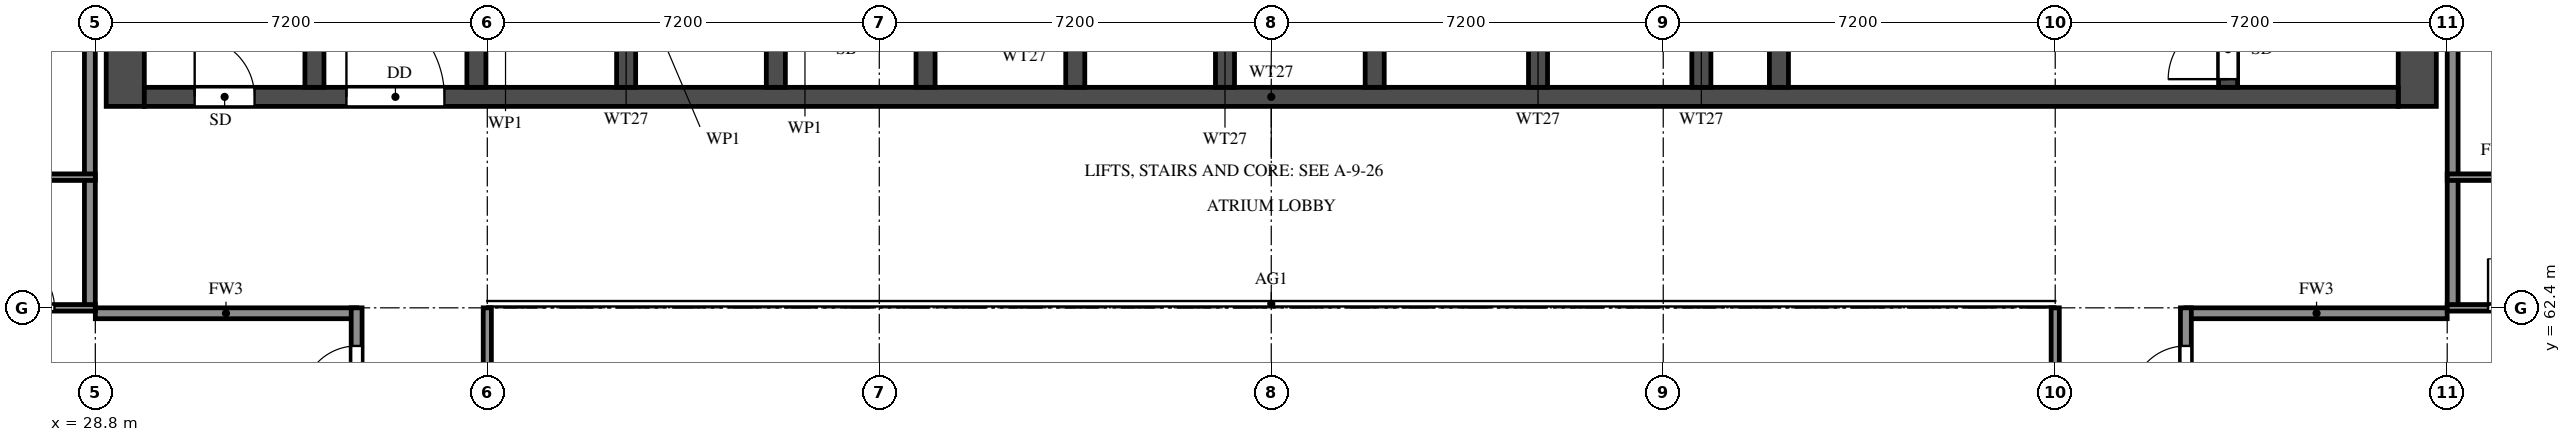
"""IFC4 building model, lengths in metres.
Left out: names, types, materials, properties, quantities, classifications, styles, units other than length and angle.
Written with IfcOpenShell. Run it as: python <this file> out.ifc"""

import sys

from ifc_helpers import new_model, si_unit, direction, frame, frame_2d, origin, place, context, subcontext, project, spatial, rectangle, extrude, element, fill, save


model = new_model("IFC4")
c1 = context("Model", 3, precision=1e-05, world=origin(), true_north=direction((0.0, 1.0)))
c2 = subcontext(c1, "Body", "Model", "MODEL_VIEW")
j1 = project(units=[si_unit("LENGTHUNIT", "METRE"), si_unit("PLANEANGLEUNIT", "RADIAN")], contexts=[c1])
p1 = place(None, origin())
s1 = spatial("IfcSite", under=j1, at=p1, CompositionType="ELEMENT")
p2 = place(p1, origin())
s2 = spatial("IfcBuilding", under=s1, at=p2, CompositionType="ELEMENT")
p3 = place(p2, frame((0.0, 0.0, 195.5)))
s3 = spatial("IfcBuildingStorey", under=s2, at=p3, CompositionType="ELEMENT", Elevation=195.5)
for number, where, z_axis, x_axis in (
    (1, (29.35, 66.1, 0.0), (0.0, 0.0, 1.0), (0.0, 1.0, 0.0)),
    (2, (71.45, 66.1, 0.0), (0.0, 0.0, 1.0), (0.0, 1.0, 0.0)),
):
    element("IfcWall", number, at=place(p3, frame(where, z_axis=z_axis, x_axis=x_axis)), inside=s3, PredefinedType="SHEAR", context=c2, shape_type="SweptSolid", body=[
        extrude(rectangle(XDim=11.9, YDim=0.7, at=frame_2d((5.95, 0.0))), origin(), (0.0, 0.0, 1.0), 3.2),
    ])
p4 = place(p3, frame((29.7, 66.275, 0.0), z_axis=(0.0, 0.0, 1.0), x_axis=(1.0, 0.0, 0.0)))
e3 = element("IfcWall", 3, at=p4, inside=s3, PredefinedType="SHEAR", context=c2, shape_type="SweptSolid", body=[
    extrude(rectangle(XDim=41.4, YDim=0.35, at=frame_2d((20.7, 0.0))), origin(), (0.0, 0.0, 1.0), 3.2),
])
p5 = place(p4, frame((0.925, 0.0, 0.0)))
e4 = element("IfcOpeningElement", 4, at=p5, cuts=e3, PredefinedType="OPENING", context=c2, shape_type="SweptSolid", body=[
    extrude(rectangle(XDim=1.1, YDim=2.1, at=frame_2d((0.55, 1.05))), frame((0.0, 0.185, 0.0), z_axis=(0.0, -1.0, 0.0), x_axis=(1.0, 0.0, 0.0)), (0.0, 0.0, 1.0), 0.37),
])
p6 = place(p4, frame((3.712, 0.0, 0.0)))
e5 = element("IfcOpeningElement", 5, at=p6, cuts=e3, PredefinedType="OPENING", context=c2, shape_type="SweptSolid", body=[
    extrude(rectangle(XDim=1.8, YDim=2.1, at=frame_2d((0.9, 1.05))), frame((0.0, 0.185, 0.0), z_axis=(0.0, -1.0, 0.0), x_axis=(1.0, 0.0, 0.0)), (0.0, 0.0, 1.0), 0.37),
])
p7 = place(p3, frame((32.825, 66.45, 0.0), z_axis=(0.0, 0.0, 1.0), x_axis=(0.0, 1.0, 0.0)))
e6 = element("IfcWall", 6, at=p7, inside=s3, PredefinedType="SHEAR", context=c2, shape_type="SweptSolid", body=[
    extrude(rectangle(XDim=10.85, YDim=0.35, at=frame_2d((5.425, 0.0))), origin(), (0.0, 0.0, 1.0), 3.2),
])
p8 = place(p3, frame((67.975, 66.45, 0.0), z_axis=(0.0, 0.0, 1.0), x_axis=(0.0, 1.0, 0.0)))
e7 = element("IfcWall", 7, at=p8, inside=s3, PredefinedType="SHEAR", context=c2, shape_type="SweptSolid", body=[
    extrude(rectangle(XDim=10.85, YDim=0.35, at=frame_2d((5.425, 0.0))), origin(), (0.0, 0.0, 1.0), 3.2),
])
p9 = place(p8, frame((0.15, 0.0, 0.0)))
e8 = element("IfcOpeningElement", 8, at=p9, cuts=e7, PredefinedType="OPENING", context=c2, shape_type="SweptSolid", body=[
    extrude(rectangle(XDim=1.1, YDim=2.1, at=frame_2d((0.55, 1.05))), frame((0.0, 0.185, 0.0), z_axis=(0.0, -1.0, 0.0), x_axis=(1.0, 0.0, 0.0)), (0.0, 0.0, 1.0), 0.37),
])
p10 = place(p3, frame((59.725, 66.45, 0.0), z_axis=(0.0, 0.0, 1.0), x_axis=(0.0, 1.0, 0.0)))
e9 = element("IfcWall", 9, at=p10, inside=s3, PredefinedType="SHEAR", context=c2, shape_type="SweptSolid", body=[
    extrude(rectangle(XDim=6.125, YDim=0.35, at=frame_2d((3.062, 0.0))), origin(), (0.0, 0.0, 1.0), 3.2),
])
p11 = place(p10, frame((3.85, 0.0, 0.0)))
e10 = element("IfcOpeningElement", 10, at=p11, cuts=e9, PredefinedType="OPENING", context=c2, shape_type="SweptSolid", body=[
    extrude(rectangle(XDim=1.2, YDim=2.1, at=frame_2d((0.6, 1.05))), frame((0.0, 0.185, 0.0), z_axis=(0.0, -1.0, 0.0), x_axis=(1.0, 0.0, 0.0)), (0.0, 0.0, 1.0), 0.37),
])
for number, where, z_axis, x_axis in (
    (11, (35.8, 66.45, 0.0), (0.0, 0.0, 1.0), (0.0, 1.0, 0.0)),
    (12, (38.55, 66.45, 0.0), (0.0, 0.0, 1.0), (0.0, 1.0, 0.0)),
    (13, (41.3, 66.45, 0.0), (0.0, 0.0, 1.0), (0.0, 1.0, 0.0)),
    (14, (44.05, 66.45, 0.0), (0.0, 0.0, 1.0), (0.0, 1.0, 0.0)),
    (15, (46.8, 66.45, 0.0), (0.0, 0.0, 1.0), (0.0, 1.0, 0.0)),
    (16, (49.55, 66.45, 0.0), (0.0, 0.0, 1.0), (0.0, 1.0, 0.0)),
    (17, (52.3, 66.45, 0.0), (0.0, 0.0, 1.0), (0.0, 1.0, 0.0)),
    (18, (55.3, 66.45, 0.0), (0.0, 0.0, 1.0), (0.0, 1.0, 0.0)),
    (19, (58.3, 66.45, 0.0), (0.0, 0.0, 1.0), (0.0, 1.0, 0.0)),
):
    element("IfcWall", number, at=place(p3, frame(where, z_axis=z_axis, x_axis=x_axis)), inside=s3, PredefinedType="SHEAR", context=c2, shape_type="SweptSolid", body=[
        extrude(rectangle(XDim=2.425, YDim=0.35, at=frame_2d((1.212, 0.0))), origin(), (0.0, 0.0, 1.0), 3.2),
    ])
for number, where, z_axis, x_axis in (
    (20, (28.8, 62.3, 0.0), (0.0, 0.0, 1.0), (1.0, 0.0, 0.0)),
    (21, (67.2, 62.3, 0.0), (0.0, 0.0, 1.0), (1.0, 0.0, 0.0)),
):
    element("IfcWall", number, at=place(p3, frame(where, z_axis=z_axis, x_axis=x_axis)), inside=s3, PredefinedType="SOLIDWALL", context=c2, shape_type="SweptSolid", body=[
        extrude(rectangle(XDim=4.8, YDim=0.2, at=frame_2d((2.4, 0.0))), origin(), (0.0, 0.0, 1.0), 3.2),
    ])
p12 = place(p3, frame((28.7, 62.4, 0.0), z_axis=(0.0, 0.0, 1.0), x_axis=(0.0, 1.0, 0.0)))
e22 = element("IfcWall", 22, at=p12, inside=s3, PredefinedType="SOLIDWALL", context=c2, shape_type="SweptSolid", body=[
    extrude(rectangle(XDim=15.6, YDim=0.2, at=frame_2d((7.8, 0.0))), origin(), (0.0, 0.0, 1.0), 3.2),
])
p13 = place(p3, frame((33.6, 45.6, 0.0), z_axis=(0.0, 0.0, 1.0), x_axis=(0.0, 1.0, 0.0)))
e23 = element("IfcWall", 23, at=p13, inside=s3, PredefinedType="SOLIDWALL", context=c2, shape_type="SweptSolid", body=[
    extrude(rectangle(XDim=16.8, YDim=0.2, at=frame_2d((8.4, 0.0))), origin(), (0.0, 0.0, 1.0), 3.2),
])
p14 = place(p13, frame((0.7, 0.0, 0.0)))
e24 = element("IfcOpeningElement", 24, at=p14, cuts=e23, PredefinedType="OPENING", context=c2, shape_type="SweptSolid", body=[
    extrude(rectangle(XDim=1.0, YDim=2.1, at=frame_2d((0.5, 1.05))), frame((0.0, 0.11, 0.0), z_axis=(0.0, -1.0, 0.0), x_axis=(1.0, 0.0, 0.0)), (0.0, 0.0, 1.0), 0.22),
])
p15 = place(p13, frame((8.3, 0.0, 0.0)))
e25 = element("IfcOpeningElement", 25, at=p15, cuts=e23, PredefinedType="OPENING", context=c2, shape_type="SweptSolid", body=[
    extrude(rectangle(XDim=1.0, YDim=2.1, at=frame_2d((0.5, 1.05))), frame((0.0, 0.11, 0.0), z_axis=(0.0, -1.0, 0.0), x_axis=(1.0, 0.0, 0.0)), (0.0, 0.0, 1.0), 0.22),
])
p16 = place(p13, frame((15.1, 0.0, 0.0)))
e26 = element("IfcOpeningElement", 26, at=p16, cuts=e23, PredefinedType="OPENING", context=c2, shape_type="SweptSolid", body=[
    extrude(rectangle(XDim=1.0, YDim=2.1, at=frame_2d((0.5, 1.05))), frame((0.0, 0.11, 0.0), z_axis=(0.0, -1.0, 0.0), x_axis=(1.0, 0.0, 0.0)), (0.0, 0.0, 1.0), 0.22),
])
p17 = place(p3, frame((67.2, 60.0, 0.0), z_axis=(0.0, 0.0, 1.0), x_axis=(0.0, 1.0, 0.0)))
e27 = element("IfcWall", 27, at=p17, inside=s3, PredefinedType="SOLIDWALL", context=c2, shape_type="SweptSolid", body=[
    extrude(rectangle(XDim=2.4, YDim=0.2, at=frame_2d((1.2, 0.0))), origin(), (0.0, 0.0, 1.0), 3.2),
])
p18 = place(p17, frame((0.7, 0.0, 0.0)))
e28 = element("IfcOpeningElement", 28, at=p18, cuts=e27, PredefinedType="OPENING", context=c2, shape_type="SweptSolid", body=[
    extrude(rectangle(XDim=1.0, YDim=2.1, at=frame_2d((0.5, 1.05))), frame((0.0, 0.11, 0.0), z_axis=(0.0, -1.0, 0.0), x_axis=(1.0, 0.0, 0.0)), (0.0, 0.0, 1.0), 0.22),
])
p19 = place(p3, frame((72.1, 62.4, 0.0), z_axis=(0.0, 0.0, 1.0), x_axis=(0.0, 1.0, 0.0)))
e29 = element("IfcWall", 29, at=p19, inside=s3, PredefinedType="SOLIDWALL", context=c2, shape_type="SweptSolid", body=[
    extrude(rectangle(XDim=15.6, YDim=0.2, at=frame_2d((7.8, 0.0))), origin(), (0.0, 0.0, 1.0), 3.2),
])
p20 = place(p3, frame((26.4, 62.4, 0.0), z_axis=(0.0, 0.0, 1.0), x_axis=(1.0, 0.0, 0.0)))
e30 = element("IfcWall", 30, at=p20, inside=s3, PredefinedType="PARTITIONING", context=c2, shape_type="SweptSolid", body=[
    extrude(rectangle(XDim=2.4, YDim=0.12, at=frame_2d((1.2, 0.0))), origin(), (0.0, 0.0, 1.0), 3.2),
])
p21 = place(p20, frame((0.75, 0.0, 0.0)))
e31 = element("IfcOpeningElement", 31, at=p21, cuts=e30, PredefinedType="OPENING", context=c2, shape_type="SweptSolid", body=[
    extrude(rectangle(XDim=0.9, YDim=2.1, at=frame_2d((0.45, 1.05))), frame((0.0, 0.07, 0.0), z_axis=(0.0, -1.0, 0.0), x_axis=(1.0, 0.0, 0.0)), (0.0, 0.0, 1.0), 0.14),
])
p22 = place(p3, frame((72.0, 62.4, 0.0), z_axis=(0.0, 0.0, 1.0), x_axis=(1.0, 0.0, 0.0)))
e32 = element("IfcWall", 32, at=p22, inside=s3, PredefinedType="PARTITIONING", context=c2, shape_type="SweptSolid", body=[
    extrude(rectangle(XDim=2.4, YDim=0.12, at=frame_2d((1.2, 0.0))), origin(), (0.0, 0.0, 1.0), 3.2),
])
p23 = place(p22, frame((0.75, 0.0, 0.0)))
e33 = element("IfcOpeningElement", 33, at=p23, cuts=e32, PredefinedType="OPENING", context=c2, shape_type="SweptSolid", body=[
    extrude(rectangle(XDim=0.9, YDim=2.1, at=frame_2d((0.45, 1.05))), frame((0.0, 0.07, 0.0), z_axis=(0.0, -1.0, 0.0), x_axis=(1.0, 0.0, 0.0)), (0.0, 0.0, 1.0), 0.14),
])
p24 = place(p3, frame((23.7, 64.8, 0.0), z_axis=(0.0, 0.0, 1.0), x_axis=(1.0, 0.0, 0.0)))
e34 = element("IfcWall", 34, at=p24, inside=s3, PredefinedType="PARTITIONING", context=c2, shape_type="SweptSolid", body=[
    extrude(rectangle(XDim=5.1, YDim=0.12, at=frame_2d((2.55, 0.0))), origin(), (0.0, 0.0, 1.0), 3.2),
])
p25 = place(p24, frame((2.1, 0.0, 0.0)))
e35 = element("IfcOpeningElement", 35, at=p25, cuts=e34, PredefinedType="OPENING", context=c2, shape_type="SweptSolid", body=[
    extrude(rectangle(XDim=0.9, YDim=2.1, at=frame_2d((0.45, 1.05))), frame((0.0, 0.07, 0.0), z_axis=(0.0, -1.0, 0.0), x_axis=(1.0, 0.0, 0.0)), (0.0, 0.0, 1.0), 0.14),
])
p26 = place(p3, frame((72.0, 64.8, 0.0), z_axis=(0.0, 0.0, 1.0), x_axis=(1.0, 0.0, 0.0)))
e36 = element("IfcWall", 36, at=p26, inside=s3, PredefinedType="PARTITIONING", context=c2, shape_type="SweptSolid", body=[
    extrude(rectangle(XDim=5.1, YDim=0.12, at=frame_2d((2.55, 0.0))), origin(), (0.0, 0.0, 1.0), 3.2),
])
p27 = place(p26, frame((2.1, 0.0, 0.0)))
e37 = element("IfcOpeningElement", 37, at=p27, cuts=e36, PredefinedType="OPENING", context=c2, shape_type="SweptSolid", body=[
    extrude(rectangle(XDim=0.9, YDim=2.1, at=frame_2d((0.45, 1.05))), frame((0.0, 0.07, 0.0), z_axis=(0.0, -1.0, 0.0), x_axis=(1.0, 0.0, 0.0)), (0.0, 0.0, 1.0), 0.14),
])
for number, where, z_axis, x_axis in (
    (38, (36.0, 48.0, 0.0), (0.0, 0.0, 1.0), (0.0, 1.0, 0.0)),
    (39, (64.8, 48.0, 0.0), (0.0, 0.0, 1.0), (0.0, 1.0, 0.0)),
):
    element("IfcWall", number, at=place(p3, frame(where, z_axis=z_axis, x_axis=x_axis)), inside=s3, PredefinedType="SOLIDWALL", context=c2, shape_type="SweptSolid", body=[
        extrude(rectangle(XDim=14.4, YDim=0.15, at=frame_2d((7.2, 0.0))), origin(), (0.0, 0.0, 1.0), 2.3),
    ])
p28 = place(p5, origin())
e40 = element("IfcDoor", 40, at=p28, inside=s3, OperationType="SINGLE_SWING_LEFT", PredefinedType="DOOR", context=c2, shape_type="SweptSolid", body=[
    extrude(rectangle(XDim=1.1, YDim=2.1, at=frame_2d((0.55, 1.05))), frame((0.0, 0.025, 0.0), z_axis=(0.0, -1.0, 0.0), x_axis=(1.0, 0.0, 0.0)), (0.0, 0.0, 1.0), 0.05),
])
fill(e4, e40)
p29 = place(p9, origin())
e41 = element("IfcDoor", 41, at=p29, inside=s3, OperationType="SINGLE_SWING_LEFT", PredefinedType="DOOR", context=c2, shape_type="SweptSolid", body=[
    extrude(rectangle(XDim=1.1, YDim=2.1, at=frame_2d((0.55, 1.05))), frame((0.0, 0.025, 0.0), z_axis=(0.0, -1.0, 0.0), x_axis=(1.0, 0.0, 0.0)), (0.0, 0.0, 1.0), 0.05),
])
fill(e8, e41)
p30 = place(p6, origin())
e42 = element("IfcDoor", 42, at=p30, inside=s3, OperationType="DOUBLE_DOOR_SINGLE_SWING", PredefinedType="DOOR", context=c2, shape_type="SweptSolid", body=[
    extrude(rectangle(XDim=1.8, YDim=2.1, at=frame_2d((0.9, 1.05))), frame((0.0, 0.025, 0.0), z_axis=(0.0, -1.0, 0.0), x_axis=(1.0, 0.0, 0.0)), (0.0, 0.0, 1.0), 0.05),
])
fill(e5, e42)
p31 = place(p21, origin())
e43 = element("IfcDoor", 43, at=p31, inside=s3, OperationType="SINGLE_SWING_RIGHT", PredefinedType="DOOR", context=c2, shape_type="SweptSolid", body=[
    extrude(rectangle(XDim=0.9, YDim=2.1, at=frame_2d((0.45, 1.05))), frame((0.0, 0.025, 0.0), z_axis=(0.0, -1.0, 0.0), x_axis=(1.0, 0.0, 0.0)), (0.0, 0.0, 1.0), 0.05),
])
fill(e31, e43)
p32 = place(p16, origin())
e44 = element("IfcDoor", 44, at=p32, inside=s3, OperationType="SINGLE_SWING_LEFT", PredefinedType="DOOR", context=c2, shape_type="SweptSolid", body=[
    extrude(rectangle(XDim=1.0, YDim=2.1, at=frame_2d((0.5, 1.05))), frame((0.0, 0.025, 0.0), z_axis=(0.0, -1.0, 0.0), x_axis=(1.0, 0.0, 0.0)), (0.0, 0.0, 1.0), 0.05),
])
fill(e26, e44)
p33 = place(p23, origin())
e45 = element("IfcDoor", 45, at=p33, inside=s3, OperationType="SINGLE_SWING_LEFT", PredefinedType="DOOR", context=c2, shape_type="SweptSolid", body=[
    extrude(rectangle(XDim=0.9, YDim=2.1, at=frame_2d((0.45, 1.05))), frame((0.0, 0.025, 0.0), z_axis=(0.0, -1.0, 0.0), x_axis=(1.0, 0.0, 0.0)), (0.0, 0.0, 1.0), 0.05),
])
fill(e33, e45)
p34 = place(p18, origin())
e46 = element("IfcDoor", 46, at=p34, inside=s3, OperationType="SINGLE_SWING_RIGHT", PredefinedType="DOOR", context=c2, shape_type="SweptSolid", body=[
    extrude(rectangle(XDim=1.0, YDim=2.1, at=frame_2d((0.5, 1.05))), frame((0.0, 0.025, 0.0), z_axis=(0.0, -1.0, 0.0), x_axis=(1.0, 0.0, 0.0)), (0.0, 0.0, 1.0), 0.05),
])
fill(e28, e46)
save(model, sys.argv[1])
